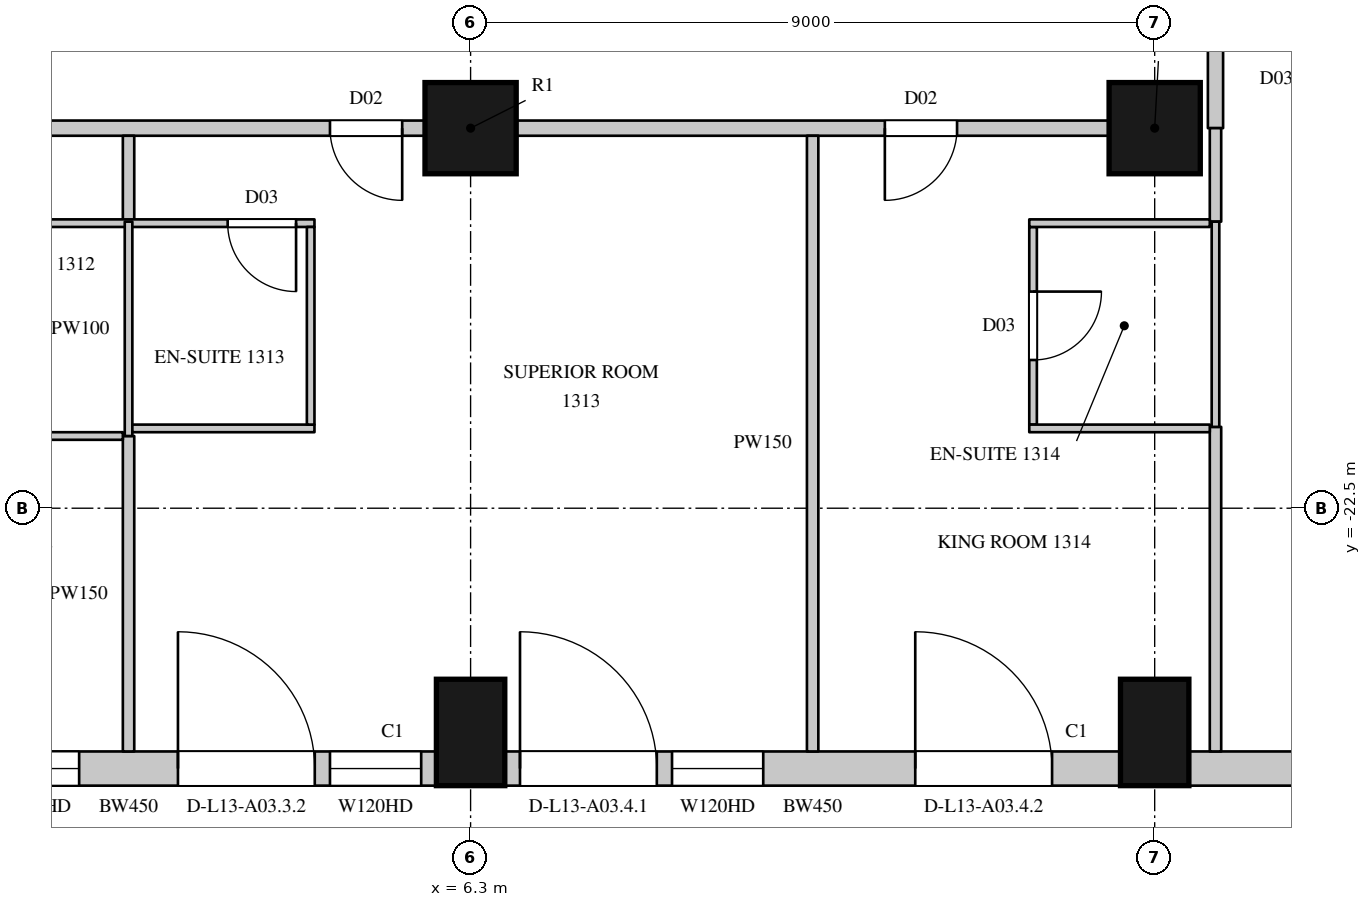
"""IFC4 building model, lengths in metres.
Left out: names, types, materials, properties, quantities, classifications, styles, units other than length and angle.
Written with IfcOpenShell. Run it as: python <this file> out.ifc"""

import sys

from ifc_helpers import new_model, si_unit, direction, frame, frame_2d, origin, origin_2d, place, context, subcontext, project, spatial, rectangle, circle, extrude, element, fill, save


model = new_model("IFC4")
c1 = context("Model", 3, precision=1e-05, world=origin(), true_north=direction((0.0, 1.0)))
c2 = subcontext(c1, "Body", "Model", "MODEL_VIEW")
j1 = project(units=[si_unit("LENGTHUNIT", "METRE"), si_unit("PLANEANGLEUNIT", "RADIAN")], contexts=[c1])
p1 = place(None, origin())
s1 = spatial("IfcSite", under=j1, at=p1, CompositionType="ELEMENT")
p2 = place(p1, origin())
s2 = spatial("IfcBuilding", under=s1, at=p2, CompositionType="ELEMENT")
p3 = place(p2, frame((0.0, 0.0, 77.1)))
s3 = spatial("IfcBuildingStorey", under=s2, at=p3, CompositionType="ELEMENT", Elevation=77.1)
for number, where, z_axis, x_axis in (
    (1, (6.3, -25.45, 0.0), (0.0, 0.0, 1.0), (1.0, 0.0, 0.0)),
    (2, (15.3, -25.45, 0.0), (0.0, 0.0, 1.0), (1.0, 0.0, 0.0)),
):
    element("IfcColumn", number, at=place(p3, frame(where, z_axis=z_axis, x_axis=x_axis)), inside=s3, PredefinedType="COLUMN", context=c2, shape_type="SweptSolid", body=[
        extrude(rectangle(XDim=0.9, YDim=1.4, at=origin_2d()), origin(), (0.0, 0.0, 1.0), 3.6),
    ])
for number, where, z_axis, x_axis in (
    (3, (6.3, -17.5, 0.0), (0.0, 0.0, 1.0), (1.0, 0.0, 0.0)),
    (4, (15.3, -17.5, 0.0), (0.0, 0.0, 1.0), (1.0, 0.0, 0.0)),
):
    element("IfcColumn", number, at=place(p3, frame(where, z_axis=z_axis, x_axis=x_axis)), inside=s3, PredefinedType="COLUMN", context=c2, shape_type="SweptSolid", body=[
        extrude(circle(Radius=0.6, at=origin_2d()), origin(), (0.0, 0.0, 1.0), 3.6),
    ])
p4 = place(p3, frame((-2.25, -25.925, 0.0), z_axis=(0.0, 0.0, 1.0), x_axis=(1.0, 0.0, 0.0)))
e5 = element("IfcWall", 5, at=p4, inside=s3, PredefinedType="SOLIDWALL", context=c2, shape_type="SweptSolid", body=[
    extrude(rectangle(XDim=8.1, YDim=0.45, at=frame_2d((4.05, 0.0))), origin(), (0.0, 0.0, 1.0), 3.3),
])
p5 = place(p4, frame((0.2, 0.0, 0.0)))
e6 = element("IfcOpeningElement", 6, at=p5, cuts=e5, PredefinedType="OPENING", context=c2, shape_type="SweptSolid", body=[
    extrude(rectangle(XDim=1.8, YDim=2.4, at=frame_2d((0.9, 1.2))), frame((0.0, 0.235, 0.0), z_axis=(0.0, -1.0, 0.0), x_axis=(1.0, 0.0, 0.0)), (0.0, 0.0, 1.0), 0.47),
])
p6 = place(p4, frame((2.2, 0.0, 1.05)))
e7 = element("IfcOpeningElement", 7, at=p6, cuts=e5, PredefinedType="OPENING", context=c2, shape_type="SweptSolid", body=[
    extrude(rectangle(XDim=1.2, YDim=2.0, at=frame_2d((0.6, 1.0))), frame((0.0, 0.235, 0.0), z_axis=(0.0, -1.0, 0.0), x_axis=(1.0, 0.0, 0.0)), (0.0, 0.0, 1.0), 0.47),
])
p7 = place(p4, frame((4.7, 0.0, 0.0)))
e8 = element("IfcOpeningElement", 8, at=p7, cuts=e5, PredefinedType="OPENING", context=c2, shape_type="SweptSolid", body=[
    extrude(rectangle(XDim=1.8, YDim=2.4, at=frame_2d((0.9, 1.2))), frame((0.0, 0.235, 0.0), z_axis=(0.0, -1.0, 0.0), x_axis=(1.0, 0.0, 0.0)), (0.0, 0.0, 1.0), 0.47),
])
p8 = place(p4, frame((6.7, 0.0, 1.05)))
e9 = element("IfcOpeningElement", 9, at=p8, cuts=e5, PredefinedType="OPENING", context=c2, shape_type="SweptSolid", body=[
    extrude(rectangle(XDim=1.2, YDim=2.0, at=frame_2d((0.6, 1.0))), frame((0.0, 0.235, 0.0), z_axis=(0.0, -1.0, 0.0), x_axis=(1.0, 0.0, 0.0)), (0.0, 0.0, 1.0), 0.47),
])
p9 = place(p3, frame((6.75, -25.925, 0.0), z_axis=(0.0, 0.0, 1.0), x_axis=(1.0, 0.0, 0.0)))
e10 = element("IfcWall", 10, at=p9, inside=s3, PredefinedType="SOLIDWALL", context=c2, shape_type="SweptSolid", body=[
    extrude(rectangle(XDim=8.1, YDim=0.45, at=frame_2d((4.05, 0.0))), origin(), (0.0, 0.0, 1.0), 3.3),
])
p10 = place(p9, frame((0.2, 0.0, 0.0)))
e11 = element("IfcOpeningElement", 11, at=p10, cuts=e10, PredefinedType="OPENING", context=c2, shape_type="SweptSolid", body=[
    extrude(rectangle(XDim=1.8, YDim=2.4, at=frame_2d((0.9, 1.2))), frame((0.0, 0.235, 0.0), z_axis=(0.0, -1.0, 0.0), x_axis=(1.0, 0.0, 0.0)), (0.0, 0.0, 1.0), 0.47),
])
p11 = place(p9, frame((2.2, 0.0, 1.05)))
e12 = element("IfcOpeningElement", 12, at=p11, cuts=e10, PredefinedType="OPENING", context=c2, shape_type="SweptSolid", body=[
    extrude(rectangle(XDim=1.2, YDim=2.0, at=frame_2d((0.6, 1.0))), frame((0.0, 0.235, 0.0), z_axis=(0.0, -1.0, 0.0), x_axis=(1.0, 0.0, 0.0)), (0.0, 0.0, 1.0), 0.47),
])
p12 = place(p9, frame((5.4, 0.0, 0.0)))
e13 = element("IfcOpeningElement", 13, at=p12, cuts=e10, PredefinedType="OPENING", context=c2, shape_type="SweptSolid", body=[
    extrude(rectangle(XDim=1.8, YDim=2.4, at=frame_2d((0.9, 1.2))), frame((0.0, 0.235, 0.0), z_axis=(0.0, -1.0, 0.0), x_axis=(1.0, 0.0, 0.0)), (0.0, 0.0, 1.0), 0.47),
])
p13 = place(p3, frame((15.75, -25.925, 0.0), z_axis=(0.0, 0.0, 1.0), x_axis=(1.0, 0.0, 0.0)))
e14 = element("IfcWall", 14, at=p13, inside=s3, PredefinedType="SOLIDWALL", context=c2, shape_type="SweptSolid", body=[
    extrude(rectangle(XDim=2.914, YDim=0.45, at=frame_2d((1.457, 0.0))), origin(), (0.0, 0.0, 1.0), 3.3),
])
p14 = place(p3, frame((-2.1, -17.5, 0.0), z_axis=(0.0, 0.0, 1.0), x_axis=(1.0, 0.0, 0.0)))
e15 = element("IfcWall", 15, at=p14, inside=s3, PredefinedType="PARTITIONING", context=c2, shape_type="SweptSolid", body=[
    extrude(rectangle(XDim=7.8, YDim=0.2, at=frame_2d((3.9, 0.0))), origin(), (0.0, 0.0, 1.0), 2.75),
])
p15 = place(p14, frame((6.55, 0.0, 0.0)))
e16 = element("IfcOpeningElement", 16, at=p15, cuts=e15, PredefinedType="OPENING", context=c2, shape_type="SweptSolid", body=[
    extrude(rectangle(XDim=0.95, YDim=2.2, at=frame_2d((0.475, 1.1))), frame((0.0, 0.11, 0.0), z_axis=(0.0, -1.0, 0.0), x_axis=(1.0, 0.0, 0.0)), (0.0, 0.0, 1.0), 0.22),
])
p16 = place(p3, frame((6.9, -17.5, 0.0), z_axis=(0.0, 0.0, 1.0), x_axis=(1.0, 0.0, 0.0)))
e17 = element("IfcWall", 17, at=p16, inside=s3, PredefinedType="PARTITIONING", context=c2, shape_type="SweptSolid", body=[
    extrude(rectangle(XDim=7.8, YDim=0.2, at=frame_2d((3.9, 0.0))), origin(), (0.0, 0.0, 1.0), 2.75),
])
p17 = place(p16, frame((4.85, 0.0, 0.0)))
e18 = element("IfcOpeningElement", 18, at=p17, cuts=e17, PredefinedType="OPENING", context=c2, shape_type="SweptSolid", body=[
    extrude(rectangle(XDim=0.95, YDim=2.2, at=frame_2d((0.475, 1.1))), frame((0.0, 0.11, 0.0), z_axis=(0.0, -1.0, 0.0), x_axis=(1.0, 0.0, 0.0)), (0.0, 0.0, 1.0), 0.22),
])
p18 = place(p3, frame((16.1, -17.5, 0.0), z_axis=(0.0, 0.0, 1.0), x_axis=(0.0, 1.0, 0.0)))
e19 = element("IfcWall", 19, at=p18, inside=s3, PredefinedType="PARTITIONING", context=c2, shape_type="SweptSolid", body=[
    extrude(rectangle(XDim=12.75, YDim=0.2, at=frame_2d((6.375, 0.0))), origin(), (0.0, 0.0, 1.0), 3.3),
])
p19 = place(p18, frame((2.75, 0.0, 0.0)))
e20 = element("IfcOpeningElement", 20, at=p19, cuts=e19, PredefinedType="OPENING", context=c2, shape_type="SweptSolid", body=[
    extrude(rectangle(XDim=0.95, YDim=2.2, at=frame_2d((0.475, 1.1))), frame((0.0, 0.11, 0.0), z_axis=(0.0, -1.0, 0.0), x_axis=(1.0, 0.0, 0.0)), (0.0, 0.0, 1.0), 0.22),
])
p20 = place(p18, frame((6.95, 0.0, 0.0)))
e21 = element("IfcOpeningElement", 21, at=p20, cuts=e19, PredefinedType="OPENING", context=c2, shape_type="SweptSolid", body=[
    extrude(rectangle(XDim=0.95, YDim=2.2, at=frame_2d((0.475, 1.1))), frame((0.0, 0.11, 0.0), z_axis=(0.0, -1.0, 0.0), x_axis=(1.0, 0.0, 0.0)), (0.0, 0.0, 1.0), 0.22),
])
p21 = place(p18, frame((11.4, 0.0, 0.0)))
e22 = element("IfcOpeningElement", 22, at=p21, cuts=e19, PredefinedType="OPENING", context=c2, shape_type="SweptSolid", body=[
    extrude(rectangle(XDim=0.95, YDim=2.2, at=frame_2d((0.475, 1.1))), frame((0.0, 0.11, 0.0), z_axis=(0.0, -1.0, 0.0), x_axis=(1.0, 0.0, 0.0)), (0.0, 0.0, 1.0), 0.22),
])
p22 = place(p3, frame((1.8, -25.7, 0.0), z_axis=(0.0, 0.0, 1.0), x_axis=(0.0, 1.0, 0.0)))
e23 = element("IfcWall", 23, at=p22, inside=s3, PredefinedType="PARTITIONING", context=c2, shape_type="SweptSolid", body=[
    extrude(rectangle(XDim=4.15, YDim=0.15, at=frame_2d((2.075, 0.0))), origin(), (0.0, 0.0, 1.0), 2.65),
])
p23 = place(p3, frame((1.8, -18.73, 0.0), z_axis=(0.0, 0.0, 1.0), x_axis=(0.0, 1.0, 0.0)))
e24 = element("IfcWall", 24, at=p23, inside=s3, PredefinedType="PARTITIONING", context=c2, shape_type="SweptSolid", body=[
    extrude(rectangle(XDim=1.13, YDim=0.15, at=frame_2d((0.565, 0.0))), origin(), (0.0, 0.0, 1.0), 2.65),
])
p24 = place(p3, frame((10.8, -25.7, 0.0), z_axis=(0.0, 0.0, 1.0), x_axis=(0.0, 1.0, 0.0)))
e25 = element("IfcWall", 25, at=p24, inside=s3, PredefinedType="PARTITIONING", context=c2, shape_type="SweptSolid", body=[
    extrude(rectangle(XDim=8.1, YDim=0.15, at=frame_2d((4.05, 0.0))), origin(), (0.0, 0.0, 1.0), 2.65),
])
p25 = place(p3, frame((16.1, -25.7, 0.0), z_axis=(0.0, 0.0, 1.0), x_axis=(0.0, 1.0, 0.0)))
e26 = element("IfcWall", 26, at=p25, inside=s3, PredefinedType="PARTITIONING", context=c2, shape_type="SweptSolid", body=[
    extrude(rectangle(XDim=4.27, YDim=0.15, at=frame_2d((2.135, 0.0))), origin(), (0.0, 0.0, 1.0), 3.3),
])
p26 = place(p3, frame((16.1, -18.73, 0.0), z_axis=(0.0, 0.0, 1.0), x_axis=(0.0, 1.0, 0.0)))
e27 = element("IfcWall", 27, at=p26, inside=s3, PredefinedType="PARTITIONING", context=c2, shape_type="SweptSolid", body=[
    extrude(rectangle(XDim=1.23, YDim=0.15, at=frame_2d((0.615, 0.0))), origin(), (0.0, 0.0, 1.0), 3.3),
])
p27 = place(p3, frame((-0.846, -21.55, 0.0), z_axis=(0.0, 0.0, 1.0), x_axis=(1.0, 0.0, 0.0)))
e28 = element("IfcWall", 28, at=p27, inside=s3, PredefinedType="PARTITIONING", context=c2, shape_type="SweptSolid", body=[
    extrude(rectangle(XDim=2.571, YDim=0.1, at=frame_2d((1.286, 0.0))), origin(), (0.0, 0.0, 1.0), 3.3),
])
p28 = place(p3, frame((-0.846, -18.75, 0.0), z_axis=(0.0, 0.0, 1.0), x_axis=(1.0, 0.0, 0.0)))
e29 = element("IfcWall", 29, at=p28, inside=s3, PredefinedType="PARTITIONING", context=c2, shape_type="SweptSolid", body=[
    extrude(rectangle(XDim=5.092, YDim=0.1, at=frame_2d((2.546, 0.0))), origin(), (0.0, 0.0, 1.0), 3.3),
])
p29 = place(p28, frame((3.95, 0.0, 0.0)))
e30 = element("IfcOpeningElement", 30, at=p29, cuts=e29, PredefinedType="OPENING", context=c2, shape_type="SweptSolid", body=[
    extrude(rectangle(XDim=0.9, YDim=2.2, at=frame_2d((0.45, 1.1))), frame((0.0, 0.06, 0.0), z_axis=(0.0, -1.0, 0.0), x_axis=(1.0, 0.0, 0.0)), (0.0, 0.0, 1.0), 0.12),
])
p30 = place(p3, frame((1.8, -21.55, 0.0), z_axis=(0.0, 0.0, 1.0), x_axis=(0.0, 1.0, 0.0)))
e31 = element("IfcWall", 31, at=p30, inside=s3, PredefinedType="PARTITIONING", context=c2, shape_type="SweptSolid", body=[
    extrude(rectangle(XDim=2.82, YDim=0.1, at=frame_2d((1.41, 0.0))), origin(), (0.0, 0.0, 1.0), 2.65),
])
p31 = place(p3, frame((1.85, -21.45, 0.0), z_axis=(0.0, 0.0, 1.0), x_axis=(1.0, 0.0, 0.0)))
e32 = element("IfcWall", 32, at=p31, inside=s3, PredefinedType="PARTITIONING", context=c2, shape_type="SweptSolid", body=[
    extrude(rectangle(XDim=2.396, YDim=0.1, at=frame_2d((1.198, 0.0))), origin(), (0.0, 0.0, 1.0), 3.3),
])
p32 = place(p3, frame((4.196, -21.4, 0.0), z_axis=(0.0, 0.0, 1.0), x_axis=(0.0, 1.0, 0.0)))
e33 = element("IfcWall", 33, at=p32, inside=s3, PredefinedType="PARTITIONING", context=c2, shape_type="SweptSolid", body=[
    extrude(rectangle(XDim=2.6, YDim=0.1, at=frame_2d((1.3, 0.0))), origin(), (0.0, 0.0, 1.0), 3.3),
])
p33 = place(p3, frame((13.7, -21.4, 0.0), z_axis=(0.0, 0.0, 1.0), x_axis=(0.0, 1.0, 0.0)))
e34 = element("IfcWall", 34, at=p33, inside=s3, PredefinedType="PARTITIONING", context=c2, shape_type="SweptSolid", body=[
    extrude(rectangle(XDim=2.6, YDim=0.1, at=frame_2d((1.3, 0.0))), origin(), (0.0, 0.0, 1.0), 3.3),
])
p34 = place(p33, frame((0.85, 0.0, 0.0)))
e35 = element("IfcOpeningElement", 35, at=p34, cuts=e34, PredefinedType="OPENING", context=c2, shape_type="SweptSolid", body=[
    extrude(rectangle(XDim=0.9, YDim=2.2, at=frame_2d((0.45, 1.1))), frame((0.0, 0.06, 0.0), z_axis=(0.0, -1.0, 0.0), x_axis=(1.0, 0.0, 0.0)), (0.0, 0.0, 1.0), 0.12),
])
for number, where, z_axis, x_axis in (
    (36, (13.65, -21.45, 0.0), (0.0, 0.0, 1.0), (1.0, 0.0, 0.0)),
    (37, (13.65, -18.75, 0.0), (0.0, 0.0, 1.0), (1.0, 0.0, 0.0)),
):
    element("IfcWall", number, at=place(p3, frame(where, z_axis=z_axis, x_axis=x_axis)), inside=s3, PredefinedType="PARTITIONING", context=c2, shape_type="SweptSolid", body=[
        extrude(rectangle(XDim=2.375, YDim=0.1, at=frame_2d((1.188, 0.0))), origin(), (0.0, 0.0, 1.0), 3.3),
    ])
p35 = place(p3, frame((16.1, -21.43, 0.0), z_axis=(0.0, 0.0, 1.0), x_axis=(0.0, 1.0, 0.0)))
e38 = element("IfcWall", 38, at=p35, inside=s3, PredefinedType="PARTITIONING", context=c2, shape_type="SweptSolid", body=[
    extrude(rectangle(XDim=2.7, YDim=0.1, at=frame_2d((1.35, 0.0))), origin(), (0.0, 0.0, 1.0), 3.3),
])
p36 = place(p6, origin())
e39 = element("IfcWindow", 39, at=p36, inside=s3, PartitioningType="SINGLE_PANEL", PredefinedType="WINDOW", context=c2, shape_type="SweptSolid", body=[
    extrude(rectangle(XDim=1.2, YDim=2.0, at=frame_2d((0.6, 1.0))), frame((0.0, 0.135, 0.0), z_axis=(0.0, -1.0, 0.0), x_axis=(1.0, 0.0, 0.0)), (0.0, 0.0, 1.0), 0.06),
])
fill(e7, e39)
p37 = place(p7, origin())
e40 = element("IfcDoor", 40, at=p37, inside=s3, OperationType="SLIDING_TO_LEFT", PredefinedType="DOOR", context=c2, shape_type="SweptSolid", body=[
    extrude(rectangle(XDim=1.8, YDim=2.4, at=frame_2d((0.9, 1.2))), frame((0.0, 0.13, 0.0), z_axis=(0.0, -1.0, 0.0), x_axis=(1.0, 0.0, 0.0)), (0.0, 0.0, 1.0), 0.05),
])
fill(e8, e40)
p38 = place(p8, origin())
e41 = element("IfcWindow", 41, at=p38, inside=s3, PartitioningType="SINGLE_PANEL", PredefinedType="WINDOW", context=c2, shape_type="SweptSolid", body=[
    extrude(rectangle(XDim=1.2, YDim=2.0, at=frame_2d((0.6, 1.0))), frame((0.0, 0.135, 0.0), z_axis=(0.0, -1.0, 0.0), x_axis=(1.0, 0.0, 0.0)), (0.0, 0.0, 1.0), 0.06),
])
fill(e9, e41)
p39 = place(p10, origin())
e42 = element("IfcDoor", 42, at=p39, inside=s3, OperationType="SLIDING_TO_LEFT", PredefinedType="DOOR", context=c2, shape_type="SweptSolid", body=[
    extrude(rectangle(XDim=1.8, YDim=2.4, at=frame_2d((0.9, 1.2))), frame((0.0, 0.13, 0.0), z_axis=(0.0, -1.0, 0.0), x_axis=(1.0, 0.0, 0.0)), (0.0, 0.0, 1.0), 0.05),
])
fill(e11, e42)
p40 = place(p11, origin())
e43 = element("IfcWindow", 43, at=p40, inside=s3, PartitioningType="SINGLE_PANEL", PredefinedType="WINDOW", context=c2, shape_type="SweptSolid", body=[
    extrude(rectangle(XDim=1.2, YDim=2.0, at=frame_2d((0.6, 1.0))), frame((0.0, 0.135, 0.0), z_axis=(0.0, -1.0, 0.0), x_axis=(1.0, 0.0, 0.0)), (0.0, 0.0, 1.0), 0.06),
])
fill(e12, e43)
p41 = place(p12, origin())
e44 = element("IfcDoor", 44, at=p41, inside=s3, OperationType="SLIDING_TO_LEFT", PredefinedType="DOOR", context=c2, shape_type="SweptSolid", body=[
    extrude(rectangle(XDim=1.8, YDim=2.4, at=frame_2d((0.9, 1.2))), frame((0.0, 0.13, 0.0), z_axis=(0.0, -1.0, 0.0), x_axis=(1.0, 0.0, 0.0)), (0.0, 0.0, 1.0), 0.05),
])
fill(e13, e44)
p42 = place(p15, origin())
e45 = element("IfcDoor", 45, at=p42, inside=s3, OperationType="SINGLE_SWING_LEFT", PredefinedType="DOOR", context=c2, shape_type="SweptSolid", body=[
    extrude(rectangle(XDim=0.95, YDim=2.2, at=frame_2d((0.475, 1.1))), frame((0.0, 0.025, 0.0), z_axis=(0.0, -1.0, 0.0), x_axis=(1.0, 0.0, 0.0)), (0.0, 0.0, 1.0), 0.05),
])
fill(e16, e45)
p43 = place(p29, origin())
e46 = element("IfcDoor", 46, at=p43, inside=s3, OperationType="SINGLE_SWING_LEFT", PredefinedType="DOOR", context=c2, shape_type="SweptSolid", body=[
    extrude(rectangle(XDim=0.9, YDim=2.2, at=frame_2d((0.45, 1.1))), frame((0.0, 0.025, 0.0), z_axis=(0.0, -1.0, 0.0), x_axis=(1.0, 0.0, 0.0)), (0.0, 0.0, 1.0), 0.05),
])
fill(e30, e46)
p44 = place(p17, origin())
e47 = element("IfcDoor", 47, at=p44, inside=s3, OperationType="SINGLE_SWING_RIGHT", PredefinedType="DOOR", context=c2, shape_type="SweptSolid", body=[
    extrude(rectangle(XDim=0.95, YDim=2.2, at=frame_2d((0.475, 1.1))), frame((0.0, 0.025, 0.0), z_axis=(0.0, -1.0, 0.0), x_axis=(1.0, 0.0, 0.0)), (0.0, 0.0, 1.0), 0.05),
])
fill(e18, e47)
p45 = place(p34, origin())
e48 = element("IfcDoor", 48, at=p45, inside=s3, OperationType="SINGLE_SWING_LEFT", PredefinedType="DOOR", context=c2, shape_type="SweptSolid", body=[
    extrude(rectangle(XDim=0.9, YDim=2.2, at=frame_2d((0.45, 1.1))), frame((0.0, 0.025, 0.0), z_axis=(0.0, -1.0, 0.0), x_axis=(1.0, 0.0, 0.0)), (0.0, 0.0, 1.0), 0.05),
])
fill(e35, e48)
save(model, sys.argv[1])
